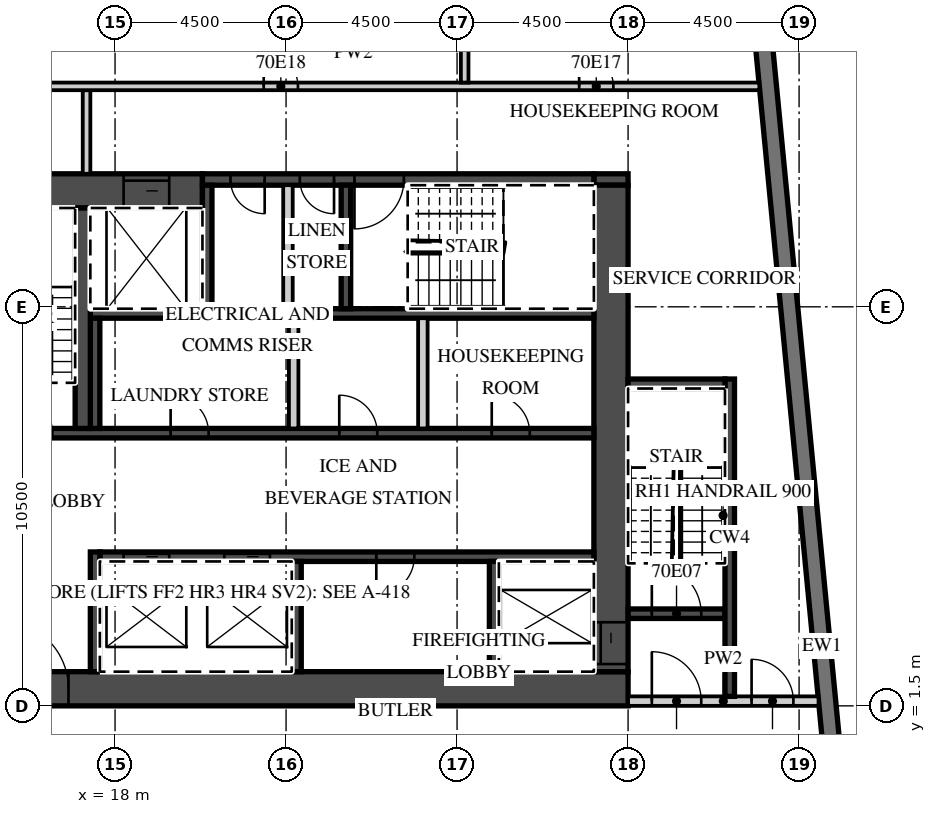
"""IFC4 building model, lengths in metres.
Left out: names, types, materials, properties, quantities, classifications, styles, units other than length and angle.
Written with IfcOpenShell. Run it as: python <this file> out.ifc"""

import sys

from ifc_helpers import new_model, si_unit, direction, frame, frame_2d, origin, place, context, subcontext, project, spatial, rectangle, extrude, element, fill, save


model = new_model("IFC4")
c1 = context("Model", 3, precision=1e-05, world=origin(), true_north=direction((0.0, 1.0)))
c2 = subcontext(c1, "Body", "Model", "MODEL_VIEW")
j1 = project(units=[si_unit("LENGTHUNIT", "METRE"), si_unit("PLANEANGLEUNIT", "RADIAN")], contexts=[c1])
p1 = place(None, origin())
s1 = spatial("IfcSite", under=j1, at=p1, CompositionType="ELEMENT")
p2 = place(p1, origin())
s2 = spatial("IfcBuilding", under=s1, at=p2, CompositionType="ELEMENT")
p3 = place(p2, frame((0.0, 0.0, 281.7)))
s3 = spatial("IfcBuildingStorey", under=s2, at=p3, CompositionType="ELEMENT", Elevation=281.7)
p4 = place(p3, frame((38.132, -12.858, 0.0), z_axis=(0.0, 0.0, 1.0), x_axis=(-0.095847749461, 0.995396006082, 0.0)))
e1 = element("IfcWall", 1, at=p4, inside=s3, PredefinedType="SOLIDWALL", context=c2, shape_type="SweptSolid", body=[
    extrude(rectangle(XDim=32.0, YDim=0.45, at=frame_2d((16.0, 0.0))), origin(), (0.0, 0.0, 1.0), 3.02),
])
p5 = place(p3, frame((13.5, 1.95, 0.0), z_axis=(0.0, 0.0, 1.0), x_axis=(1.0, 0.0, 0.0)))
e2 = element("IfcWall", 2, at=p5, inside=s3, PredefinedType="SHEAR", context=c2, shape_type="SweptSolid", body=[
    extrude(rectangle(XDim=18.0, YDim=0.9, at=frame_2d((9.0, 0.0))), origin(), (0.0, 0.0, 1.0), 3.02),
])
p6 = place(p5, frame((1.475, 0.0, 0.0)))
e3 = element("IfcOpeningElement", 3, at=p6, cuts=e2, PredefinedType="OPENING", context=c2, shape_type="SweptSolid", body=[
    extrude(rectangle(XDim=1.8, YDim=2.1, at=frame_2d((0.9, 1.05))), frame((0.0, 0.46, 0.0), z_axis=(0.0, -1.0, 0.0), x_axis=(1.0, 0.0, 0.0)), (0.0, 0.0, 1.0), 0.92),
])
p7 = place(p3, frame((13.5, 15.05, 0.0), z_axis=(0.0, 0.0, 1.0), x_axis=(1.0, 0.0, 0.0)))
e4 = element("IfcWall", 4, at=p7, inside=s3, PredefinedType="SHEAR", context=c2, shape_type="SweptSolid", body=[
    extrude(rectangle(XDim=6.8, YDim=0.9, at=frame_2d((3.4, 0.0))), origin(), (0.0, 0.0, 1.0), 3.02),
])
p8 = place(p7, frame((4.725, 0.0, 0.0)))
e5 = element("IfcOpeningElement", 5, at=p8, cuts=e4, PredefinedType="OPENING", context=c2, shape_type="SweptSolid", body=[
    extrude(rectangle(XDim=1.2, YDim=2.1, at=frame_2d((0.6, 1.05))), frame((0.0, 0.46, 0.0), z_axis=(0.0, -1.0, 0.0), x_axis=(1.0, 0.0, 0.0)), (0.0, 0.0, 1.0), 0.92),
])
p9 = place(p3, frame((30.6, 15.35, 0.0), z_axis=(0.0, 0.0, 1.0), x_axis=(1.0, 0.0, 0.0)))
e6 = element("IfcWall", 6, at=p9, inside=s3, PredefinedType="SHEAR", context=c2, shape_type="SweptSolid", body=[
    extrude(rectangle(XDim=0.9, YDim=0.3, at=frame_2d((0.45, 0.0))), origin(), (0.0, 0.0, 1.0), 3.02),
])
p10 = place(p3, frame((20.3, 15.35, 0.0), z_axis=(0.0, 0.0, 1.0), x_axis=(1.0, 0.0, 0.0)))
e7 = element("IfcWall", 7, at=p10, inside=s3, PredefinedType="SHEAR", context=c2, shape_type="SweptSolid", body=[
    extrude(rectangle(XDim=10.3, YDim=0.3, at=frame_2d((5.15, 0.0))), origin(), (0.0, 0.0, 1.0), 3.02),
])
p11 = place(p10, frame((4.0, 0.0, 0.0)))
e8 = element("IfcOpeningElement", 8, at=p11, cuts=e7, PredefinedType="OPENING", context=c2, shape_type="SweptSolid", body=[
    extrude(rectangle(XDim=1.3, YDim=2.1, at=frame_2d((0.65, 1.05))), frame((0.0, 0.16, 0.0), z_axis=(0.0, -1.0, 0.0), x_axis=(1.0, 0.0, 0.0)), (0.0, 0.0, 1.0), 0.32),
])
p12 = place(p10, frame((2.562, 0.0, 0.0)))
e9 = element("IfcOpeningElement", 9, at=p12, cuts=e7, PredefinedType="OPENING", context=c2, shape_type="SweptSolid", body=[
    extrude(rectangle(XDim=0.9, YDim=2.1, at=frame_2d((0.45, 1.05))), frame((0.0, 0.16, 0.0), z_axis=(0.0, -1.0, 0.0), x_axis=(1.0, 0.0, 0.0)), (0.0, 0.0, 1.0), 0.32),
])
p13 = place(p10, frame((0.738, 0.0, 0.0)))
e10 = element("IfcOpeningElement", 10, at=p13, cuts=e7, PredefinedType="OPENING", context=c2, shape_type="SweptSolid", body=[
    extrude(rectangle(XDim=0.9, YDim=2.1, at=frame_2d((0.45, 1.05))), frame((0.0, 0.16, 0.0), z_axis=(0.0, -1.0, 0.0), x_axis=(1.0, 0.0, 0.0)), (0.0, 0.0, 1.0), 0.32),
])
p14 = place(p3, frame((31.05, 2.4, 0.0), z_axis=(0.0, 0.0, 1.0), x_axis=(0.0, 1.0, 0.0)))
e11 = element("IfcWall", 11, at=p14, inside=s3, PredefinedType="SHEAR", context=c2, shape_type="SweptSolid", body=[
    extrude(rectangle(XDim=12.8, YDim=0.9, at=frame_2d((6.4, 0.0))), origin(), (0.0, 0.0, 1.0), 3.02),
])
p15 = place(p14, frame((0.2, 0.0, 0.0)))
e12 = element("IfcOpeningElement", 12, at=p15, cuts=e11, PredefinedType="OPENING", context=c2, shape_type="SweptSolid", body=[
    extrude(rectangle(XDim=1.1, YDim=2.1, at=frame_2d((0.55, 1.05))), frame((0.0, 0.46, 0.0), z_axis=(0.0, -1.0, 0.0), x_axis=(1.0, 0.0, 0.0)), (0.0, 0.0, 1.0), 0.92),
])
p16 = place(p3, frame((17.6, 5.425, 0.0), z_axis=(0.0, 0.0, 1.0), x_axis=(1.0, 0.0, 0.0)))
e13 = element("IfcWall", 13, at=p16, inside=s3, PredefinedType="SHEAR", context=c2, shape_type="SweptSolid", body=[
    extrude(rectangle(XDim=13.0, YDim=0.25, at=frame_2d((6.5, 0.0))), origin(), (0.0, 0.0, 1.0), 3.02),
])
p17 = place(p16, frame((3.275, 0.0, 0.0)))
e14 = element("IfcOpeningElement", 14, at=p17, cuts=e13, PredefinedType="OPENING", context=c2, shape_type="SweptSolid", body=[
    extrude(rectangle(XDim=1.2, YDim=2.1, at=frame_2d((0.6, 1.05))), frame((0.0, 0.135, 0.0), z_axis=(0.0, -1.0, 0.0), x_axis=(1.0, 0.0, 0.0)), (0.0, 0.0, 1.0), 0.27),
])
p18 = place(p16, frame((0.625, 0.0, 0.0)))
e15 = element("IfcOpeningElement", 15, at=p18, cuts=e13, PredefinedType="OPENING", context=c2, shape_type="SweptSolid", body=[
    extrude(rectangle(XDim=1.2, YDim=2.1, at=frame_2d((0.6, 1.05))), frame((0.0, 0.135, 0.0), z_axis=(0.0, -1.0, 0.0), x_axis=(1.0, 0.0, 0.0)), (0.0, 0.0, 1.0), 0.27),
])
p19 = place(p16, frame((7.275, 0.0, 0.0)))
e16 = element("IfcOpeningElement", 16, at=p19, cuts=e13, PredefinedType="OPENING", context=c2, shape_type="SweptSolid", body=[
    extrude(rectangle(XDim=1.0, YDim=2.1, at=frame_2d((0.5, 1.05))), frame((0.0, 0.135, 0.0), z_axis=(0.0, -1.0, 0.0), x_axis=(1.0, 0.0, 0.0)), (0.0, 0.0, 1.0), 0.27),
])
p20 = place(p3, frame((17.475, 2.4, 0.0), z_axis=(0.0, 0.0, 1.0), x_axis=(0.0, 1.0, 0.0)))
e17 = element("IfcWall", 17, at=p20, inside=s3, PredefinedType="SHEAR", context=c2, shape_type="SweptSolid", body=[
    extrude(rectangle(XDim=3.15, YDim=0.25, at=frame_2d((1.575, 0.0))), origin(), (0.0, 0.0, 1.0), 3.02),
])
for number, where, z_axis, x_axis in (
    (18, (27.975, 2.4, 0.0), (0.0, 0.0, 1.0), (0.0, 1.0, 0.0)),
    (19, (22.775, 2.4, 0.0), (0.0, 0.0, 1.0), (0.0, 1.0, 0.0)),
):
    element("IfcWall", number, at=place(p3, frame(where, z_axis=z_axis, x_axis=x_axis)), inside=s3, PredefinedType="SHEAR", context=c2, shape_type="SweptSolid", body=[
        extrude(rectangle(XDim=2.9, YDim=0.25, at=frame_2d((1.45, 0.0))), origin(), (0.0, 0.0, 1.0), 3.02),
    ])
p21 = place(p3, frame((14.4, 8.675, 0.0), z_axis=(0.0, 0.0, 1.0), x_axis=(1.0, 0.0, 0.0)))
e20 = element("IfcWall", 20, at=p21, inside=s3, PredefinedType="SHEAR", context=c2, shape_type="SweptSolid", body=[
    extrude(rectangle(XDim=16.2, YDim=0.25, at=frame_2d((8.1, 0.0))), origin(), (0.0, 0.0, 1.0), 3.02),
])
p22 = place(p21, frame((0.65, 0.0, 0.0)))
e21 = element("IfcOpeningElement", 21, at=p22, cuts=e20, PredefinedType="OPENING", context=c2, shape_type="SweptSolid", body=[
    extrude(rectangle(XDim=1.3, YDim=2.1, at=frame_2d((0.65, 1.05))), frame((0.0, 0.135, 0.0), z_axis=(0.0, -1.0, 0.0), x_axis=(1.0, 0.0, 0.0)), (0.0, 0.0, 1.0), 0.27),
])
p23 = place(p21, frame((13.512, 0.0, 0.0)))
e22 = element("IfcOpeningElement", 22, at=p23, cuts=e20, PredefinedType="OPENING", context=c2, shape_type="SweptSolid", body=[
    extrude(rectangle(XDim=1.0, YDim=2.1, at=frame_2d((0.5, 1.05))), frame((0.0, 0.135, 0.0), z_axis=(0.0, -1.0, 0.0), x_axis=(1.0, 0.0, 0.0)), (0.0, 0.0, 1.0), 0.27),
])
p24 = place(p21, frame((9.5, 0.0, 0.0)))
e23 = element("IfcOpeningElement", 23, at=p24, cuts=e20, PredefinedType="OPENING", context=c2, shape_type="SweptSolid", body=[
    extrude(rectangle(XDim=1.0, YDim=2.1, at=frame_2d((0.5, 1.05))), frame((0.0, 0.135, 0.0), z_axis=(0.0, -1.0, 0.0), x_axis=(1.0, 0.0, 0.0)), (0.0, 0.0, 1.0), 0.27),
])
p25 = place(p21, frame((5.062, 0.0, 0.0)))
e24 = element("IfcOpeningElement", 24, at=p25, cuts=e20, PredefinedType="OPENING", context=c2, shape_type="SweptSolid", body=[
    extrude(rectangle(XDim=1.0, YDim=2.1, at=frame_2d((0.5, 1.05))), frame((0.0, 0.135, 0.0), z_axis=(0.0, -1.0, 0.0), x_axis=(1.0, 0.0, 0.0)), (0.0, 0.0, 1.0), 0.27),
])
p26 = place(p3, frame((17.35, 11.825, 0.0), z_axis=(0.0, 0.0, 1.0), x_axis=(1.0, 0.0, 0.0)))
e25 = element("IfcWall", 25, at=p26, inside=s3, PredefinedType="SHEAR", context=c2, shape_type="SweptSolid", body=[
    extrude(rectangle(XDim=13.25, YDim=0.25, at=frame_2d((6.625, 0.0))), origin(), (0.0, 0.0, 1.0), 3.02),
])
p27 = place(p3, frame((17.475, 8.8, 0.0), z_axis=(0.0, 0.0, 1.0), x_axis=(0.0, 1.0, 0.0)))
e26 = element("IfcWall", 26, at=p27, inside=s3, PredefinedType="SHEAR", context=c2, shape_type="SweptSolid", body=[
    extrude(rectangle(XDim=2.9, YDim=0.25, at=frame_2d((1.45, 0.0))), origin(), (0.0, 0.0, 1.0), 3.02),
])
for number, where, z_axis, x_axis in (
    (27, (26.1, 8.8, 0.0), (0.0, 0.0, 1.0), (0.0, 1.0, 0.0)),
    (28, (22.7, 8.8, 0.0), (0.0, 0.0, 1.0), (0.0, 1.0, 0.0)),
):
    element("IfcWall", number, at=place(p3, frame(where, z_axis=z_axis, x_axis=x_axis)), inside=s3, PredefinedType="PARTITIONING", context=c2, shape_type="SweptSolid", body=[
        extrude(rectangle(XDim=2.9, YDim=0.25, at=frame_2d((1.45, 0.0))), origin(), (0.0, 0.0, 1.0), 3.02),
    ])
p28 = place(p3, frame((17.15, 8.8, 0.0), z_axis=(0.0, 0.0, 1.0), x_axis=(0.0, 1.0, 0.0)))
e29 = element("IfcWall", 29, at=p28, inside=s3, PredefinedType="SHEAR", context=c2, shape_type="SweptSolid", body=[
    extrude(rectangle(XDim=5.8, YDim=0.4, at=frame_2d((2.9, 0.0))), origin(), (0.0, 0.0, 1.0), 3.02),
])
for number, where, z_axis, x_axis in (
    (30, (20.425, 11.95, 0.0), (0.0, 0.0, 1.0), (0.0, 1.0, 0.0)),
    (31, (24.075, 11.95, 0.0), (0.0, 0.0, 1.0), (0.0, 1.0, 0.0)),
):
    element("IfcWall", number, at=place(p3, frame(where, z_axis=z_axis, x_axis=x_axis)), inside=s3, PredefinedType="SHEAR", context=c2, shape_type="SweptSolid", body=[
        extrude(rectangle(XDim=3.25, YDim=0.25, at=frame_2d((1.625, 0.0))), origin(), (0.0, 0.0, 1.0), 3.02),
    ])
p29 = place(p3, frame((22.55, 11.95, 0.0), z_axis=(0.0, 0.0, 1.0), x_axis=(0.0, 1.0, 0.0)))
e32 = element("IfcWall", 32, at=p29, inside=s3, PredefinedType="PARTITIONING", context=c2, shape_type="SweptSolid", body=[
    extrude(rectangle(XDim=3.25, YDim=0.25, at=frame_2d((1.625, 0.0))), origin(), (0.0, 0.0, 1.0), 3.02),
])
p30 = place(p3, frame((31.5, 1.625, 0.0), z_axis=(0.0, 0.0, 1.0), x_axis=(1.0, 0.0, 0.0)))
e33 = element("IfcWall", 33, at=p30, inside=s3, PredefinedType="PARTITIONING", context=c2, shape_type="SweptSolid", body=[
    extrude(rectangle(XDim=5.012, YDim=0.25, at=frame_2d((2.506, 0.0))), origin(), (0.0, 0.0, 1.0), 3.02),
])
p31 = place(p30, frame((0.625, 0.0, 0.0)))
e34 = element("IfcOpeningElement", 34, at=p31, cuts=e33, PredefinedType="OPENING", context=c2, shape_type="SweptSolid", body=[
    extrude(rectangle(XDim=1.3, YDim=2.1, at=frame_2d((0.65, 1.05))), frame((0.0, 0.135, 0.0), z_axis=(0.0, -1.0, 0.0), x_axis=(1.0, 0.0, 0.0)), (0.0, 0.0, 1.0), 0.27),
])
p32 = place(p30, frame((3.25, 0.0, 0.0)))
e35 = element("IfcOpeningElement", 35, at=p32, cuts=e33, PredefinedType="OPENING", context=c2, shape_type="SweptSolid", body=[
    extrude(rectangle(XDim=1.1, YDim=2.1, at=frame_2d((0.55, 1.05))), frame((0.0, 0.135, 0.0), z_axis=(0.0, -1.0, 0.0), x_axis=(1.0, 0.0, 0.0)), (0.0, 0.0, 1.0), 0.27),
])
p33 = place(p3, frame((31.5, 3.925, 0.0), z_axis=(0.0, 0.0, 1.0), x_axis=(1.0, 0.0, 0.0)))
e36 = element("IfcWall", 36, at=p33, inside=s3, PredefinedType="SHEAR", context=c2, shape_type="SweptSolid", body=[
    extrude(rectangle(XDim=2.55, YDim=0.25, at=frame_2d((1.275, 0.0))), origin(), (0.0, 0.0, 1.0), 3.02),
])
p34 = place(p33, frame((0.625, 0.0, 0.0)))
e37 = element("IfcOpeningElement", 37, at=p34, cuts=e36, PredefinedType="OPENING", context=c2, shape_type="SweptSolid", body=[
    extrude(rectangle(XDim=1.3, YDim=2.1, at=frame_2d((0.65, 1.05))), frame((0.0, 0.135, 0.0), z_axis=(0.0, -1.0, 0.0), x_axis=(1.0, 0.0, 0.0)), (0.0, 0.0, 1.0), 0.27),
])
p35 = place(p3, frame((34.175, 1.75, 0.0), z_axis=(0.0, 0.0, 1.0), x_axis=(0.0, 1.0, 0.0)))
e38 = element("IfcWall", 38, at=p35, inside=s3, PredefinedType="SHEAR", context=c2, shape_type="SweptSolid", body=[
    extrude(rectangle(XDim=8.35, YDim=0.25, at=frame_2d((4.175, 0.0))), origin(), (0.0, 0.0, 1.0), 3.02),
])
p36 = place(p3, frame((31.5, 9.975, 0.0), z_axis=(0.0, 0.0, 1.0), x_axis=(1.0, 0.0, 0.0)))
e39 = element("IfcWall", 39, at=p36, inside=s3, PredefinedType="SHEAR", context=c2, shape_type="SweptSolid", body=[
    extrude(rectangle(XDim=2.55, YDim=0.25, at=frame_2d((1.275, 0.0))), origin(), (0.0, 0.0, 1.0), 3.02),
])
p37 = place(p3, frame((17.25, 15.5, 0.0), z_axis=(0.0, 0.0, 1.0), x_axis=(0.0, 1.0, 0.0)))
e40 = element("IfcWall", 40, at=p37, inside=s3, PredefinedType="PARTITIONING", context=c2, shape_type="SweptSolid", body=[
    extrude(rectangle(XDim=2.2, YDim=0.2, at=frame_2d((1.1, 0.0))), origin(), (0.0, 0.0, 1.0), 3.02),
])
p38 = place(p3, frame((13.6, 17.8, 0.0), z_axis=(0.0, 0.0, 1.0), x_axis=(1.0, 0.0, 0.0)))
e41 = element("IfcWall", 41, at=p38, inside=s3, PredefinedType="PARTITIONING", context=c2, shape_type="SweptSolid", body=[
    extrude(rectangle(XDim=21.354, YDim=0.2, at=frame_2d((10.677, 0.0))), origin(), (0.0, 0.0, 1.0), 3.02),
])
p39 = place(p38, frame((16.613, 0.0, 0.0)))
e42 = element("IfcOpeningElement", 42, at=p39, cuts=e41, PredefinedType="OPENING", context=c2, shape_type="SweptSolid", body=[
    extrude(rectangle(XDim=0.9, YDim=2.1, at=frame_2d((0.45, 1.05))), frame((0.0, 0.11, 0.0), z_axis=(0.0, -1.0, 0.0), x_axis=(1.0, 0.0, 0.0)), (0.0, 0.0, 1.0), 0.22),
])
p40 = place(p38, frame((8.312, 0.0, 0.0)))
e43 = element("IfcOpeningElement", 43, at=p40, cuts=e41, PredefinedType="OPENING", context=c2, shape_type="SweptSolid", body=[
    extrude(rectangle(XDim=0.9, YDim=2.1, at=frame_2d((0.45, 1.05))), frame((0.0, 0.11, 0.0), z_axis=(0.0, -1.0, 0.0), x_axis=(1.0, 0.0, 0.0)), (0.0, 0.0, 1.0), 0.22),
])
p41 = place(p3, frame((27.2, 17.9, 0.0), z_axis=(0.0, 0.0, 1.0), x_axis=(0.0, 1.0, 0.0)))
e44 = element("IfcWall", 44, at=p41, inside=s3, PredefinedType="PARTITIONING", context=c2, shape_type="SweptSolid", body=[
    extrude(rectangle(XDim=3.905, YDim=0.2, at=frame_2d((1.953, 0.0))), origin(), (0.0, 0.0, 1.0), 3.02),
])
p42 = place(p17, origin())
e45 = element("IfcDoor", 45, at=p42, inside=s3, OperationType="SLIDING_TO_RIGHT", PredefinedType="DOOR", context=c2, shape_type="SweptSolid", body=[
    extrude(rectangle(XDim=1.2, YDim=2.1, at=frame_2d((0.6, 1.05))), frame((0.0, 0.025, 0.0), z_axis=(0.0, -1.0, 0.0), x_axis=(1.0, 0.0, 0.0)), (0.0, 0.0, 1.0), 0.05),
])
fill(e14, e45)
p43 = place(p18, origin())
e46 = element("IfcDoor", 46, at=p43, inside=s3, OperationType="SLIDING_TO_LEFT", PredefinedType="DOOR", context=c2, shape_type="SweptSolid", body=[
    extrude(rectangle(XDim=1.2, YDim=2.1, at=frame_2d((0.6, 1.05))), frame((0.0, 0.025, 0.0), z_axis=(0.0, -1.0, 0.0), x_axis=(1.0, 0.0, 0.0)), (0.0, 0.0, 1.0), 0.05),
])
fill(e15, e46)
p44 = place(p8, origin())
e47 = element("IfcDoor", 47, at=p44, inside=s3, OperationType="SLIDING_TO_LEFT", PredefinedType="DOOR", context=c2, shape_type="SweptSolid", body=[
    extrude(rectangle(XDim=1.2, YDim=2.1, at=frame_2d((0.6, 1.05))), frame((0.0, 0.025, 0.0), z_axis=(0.0, -1.0, 0.0), x_axis=(1.0, 0.0, 0.0)), (0.0, 0.0, 1.0), 0.05),
])
fill(e5, e47)
p45 = place(p15, origin())
e48 = element("IfcDoor", 48, at=p45, inside=s3, OperationType="SLIDING_TO_LEFT", PredefinedType="DOOR", context=c2, shape_type="SweptSolid", body=[
    extrude(rectangle(XDim=1.1, YDim=2.1, at=frame_2d((0.55, 1.05))), frame((0.0, 0.025, 0.0), z_axis=(0.0, -1.0, 0.0), x_axis=(1.0, 0.0, 0.0)), (0.0, 0.0, 1.0), 0.05),
])
fill(e12, e48)
p46 = place(p6, origin())
e49 = element("IfcDoor", 49, at=p46, inside=s3, OperationType="DOUBLE_DOOR_DOUBLE_SWING", PredefinedType="DOOR", context=c2, shape_type="SweptSolid", body=[
    extrude(rectangle(XDim=1.8, YDim=2.1, at=frame_2d((0.9, 1.05))), frame((0.0, 0.025, 0.0), z_axis=(0.0, -1.0, 0.0), x_axis=(1.0, 0.0, 0.0)), (0.0, 0.0, 1.0), 0.05),
])
fill(e3, e49)
p47 = place(p31, origin())
e50 = element("IfcDoor", 50, at=p47, inside=s3, OperationType="SINGLE_SWING_LEFT", PredefinedType="DOOR", context=c2, shape_type="SweptSolid", body=[
    extrude(rectangle(XDim=1.3, YDim=2.1, at=frame_2d((0.65, 1.05))), frame((0.0, 0.025, 0.0), z_axis=(0.0, -1.0, 0.0), x_axis=(1.0, 0.0, 0.0)), (0.0, 0.0, 1.0), 0.05),
])
fill(e34, e50)
p48 = place(p34, origin())
e51 = element("IfcDoor", 51, at=p48, inside=s3, OperationType="SINGLE_SWING_LEFT", PredefinedType="DOOR", context=c2, shape_type="SweptSolid", body=[
    extrude(rectangle(XDim=1.3, YDim=2.1, at=frame_2d((0.65, 1.05))), frame((0.0, 0.025, 0.0), z_axis=(0.0, -1.0, 0.0), x_axis=(1.0, 0.0, 0.0)), (0.0, 0.0, 1.0), 0.05),
])
fill(e37, e51)
p49 = place(p32, origin())
e52 = element("IfcDoor", 52, at=p49, inside=s3, OperationType="SINGLE_SWING_LEFT", PredefinedType="DOOR", context=c2, shape_type="SweptSolid", body=[
    extrude(rectangle(XDim=1.1, YDim=2.1, at=frame_2d((0.55, 1.05))), frame((0.0, 0.025, 0.0), z_axis=(0.0, -1.0, 0.0), x_axis=(1.0, 0.0, 0.0)), (0.0, 0.0, 1.0), 0.05),
])
fill(e35, e52)
p50 = place(p11, origin())
e53 = element("IfcDoor", 53, at=p50, inside=s3, OperationType="SINGLE_SWING_LEFT", PredefinedType="DOOR", context=c2, shape_type="SweptSolid", body=[
    extrude(rectangle(XDim=1.3, YDim=2.1, at=frame_2d((0.65, 1.05))), frame((0.0, 0.025, 0.0), z_axis=(0.0, -1.0, 0.0), x_axis=(1.0, 0.0, 0.0)), (0.0, 0.0, 1.0), 0.05),
])
fill(e8, e53)
p51 = place(p12, origin())
e54 = element("IfcDoor", 54, at=p51, inside=s3, OperationType="SINGLE_SWING_RIGHT", PredefinedType="DOOR", context=c2, shape_type="SweptSolid", body=[
    extrude(rectangle(XDim=0.9, YDim=2.1, at=frame_2d((0.45, 1.05))), frame((0.0, 0.025, 0.0), z_axis=(0.0, -1.0, 0.0), x_axis=(1.0, 0.0, 0.0)), (0.0, 0.0, 1.0), 0.05),
])
fill(e9, e54)
p52 = place(p13, origin())
e55 = element("IfcDoor", 55, at=p52, inside=s3, OperationType="SINGLE_SWING_RIGHT", PredefinedType="DOOR", context=c2, shape_type="SweptSolid", body=[
    extrude(rectangle(XDim=0.9, YDim=2.1, at=frame_2d((0.45, 1.05))), frame((0.0, 0.025, 0.0), z_axis=(0.0, -1.0, 0.0), x_axis=(1.0, 0.0, 0.0)), (0.0, 0.0, 1.0), 0.05),
])
fill(e10, e55)
p53 = place(p23, origin())
e56 = element("IfcDoor", 56, at=p53, inside=s3, OperationType="SINGLE_SWING_LEFT", PredefinedType="DOOR", context=c2, shape_type="SweptSolid", body=[
    extrude(rectangle(XDim=1.0, YDim=2.1, at=frame_2d((0.5, 1.05))), frame((0.0, 0.025, 0.0), z_axis=(0.0, -1.0, 0.0), x_axis=(1.0, 0.0, 0.0)), (0.0, 0.0, 1.0), 0.05),
])
fill(e22, e56)
p54 = place(p24, origin())
e57 = element("IfcDoor", 57, at=p54, inside=s3, OperationType="SINGLE_SWING_LEFT", PredefinedType="DOOR", context=c2, shape_type="SweptSolid", body=[
    extrude(rectangle(XDim=1.0, YDim=2.1, at=frame_2d((0.5, 1.05))), frame((0.0, 0.025, 0.0), z_axis=(0.0, -1.0, 0.0), x_axis=(1.0, 0.0, 0.0)), (0.0, 0.0, 1.0), 0.05),
])
fill(e23, e57)
p55 = place(p25, origin())
e58 = element("IfcDoor", 58, at=p55, inside=s3, OperationType="SINGLE_SWING_LEFT", PredefinedType="DOOR", context=c2, shape_type="SweptSolid", body=[
    extrude(rectangle(XDim=1.0, YDim=2.1, at=frame_2d((0.5, 1.05))), frame((0.0, 0.025, 0.0), z_axis=(0.0, -1.0, 0.0), x_axis=(1.0, 0.0, 0.0)), (0.0, 0.0, 1.0), 0.05),
])
fill(e24, e58)
p56 = place(p19, origin())
e59 = element("IfcDoor", 59, at=p56, inside=s3, OperationType="SINGLE_SWING_LEFT", PredefinedType="DOOR", context=c2, shape_type="SweptSolid", body=[
    extrude(rectangle(XDim=1.0, YDim=2.1, at=frame_2d((0.5, 1.05))), frame((0.0, 0.025, 0.0), z_axis=(0.0, -1.0, 0.0), x_axis=(1.0, 0.0, 0.0)), (0.0, 0.0, 1.0), 0.05),
])
fill(e16, e59)
p57 = place(p39, origin())
e60 = element("IfcDoor", 60, at=p57, inside=s3, OperationType="SINGLE_SWING_LEFT", PredefinedType="DOOR", context=c2, shape_type="SweptSolid", body=[
    extrude(rectangle(XDim=0.9, YDim=2.1, at=frame_2d((0.45, 1.05))), frame((0.0, 0.025, 0.0), z_axis=(0.0, -1.0, 0.0), x_axis=(1.0, 0.0, 0.0)), (0.0, 0.0, 1.0), 0.05),
])
fill(e42, e60)
p58 = place(p40, origin())
e61 = element("IfcDoor", 61, at=p58, inside=s3, OperationType="SINGLE_SWING_LEFT", PredefinedType="DOOR", context=c2, shape_type="SweptSolid", body=[
    extrude(rectangle(XDim=0.9, YDim=2.1, at=frame_2d((0.45, 1.05))), frame((0.0, 0.025, 0.0), z_axis=(0.0, -1.0, 0.0), x_axis=(1.0, 0.0, 0.0)), (0.0, 0.0, 1.0), 0.05),
])
fill(e43, e61)
save(model, sys.argv[1])
